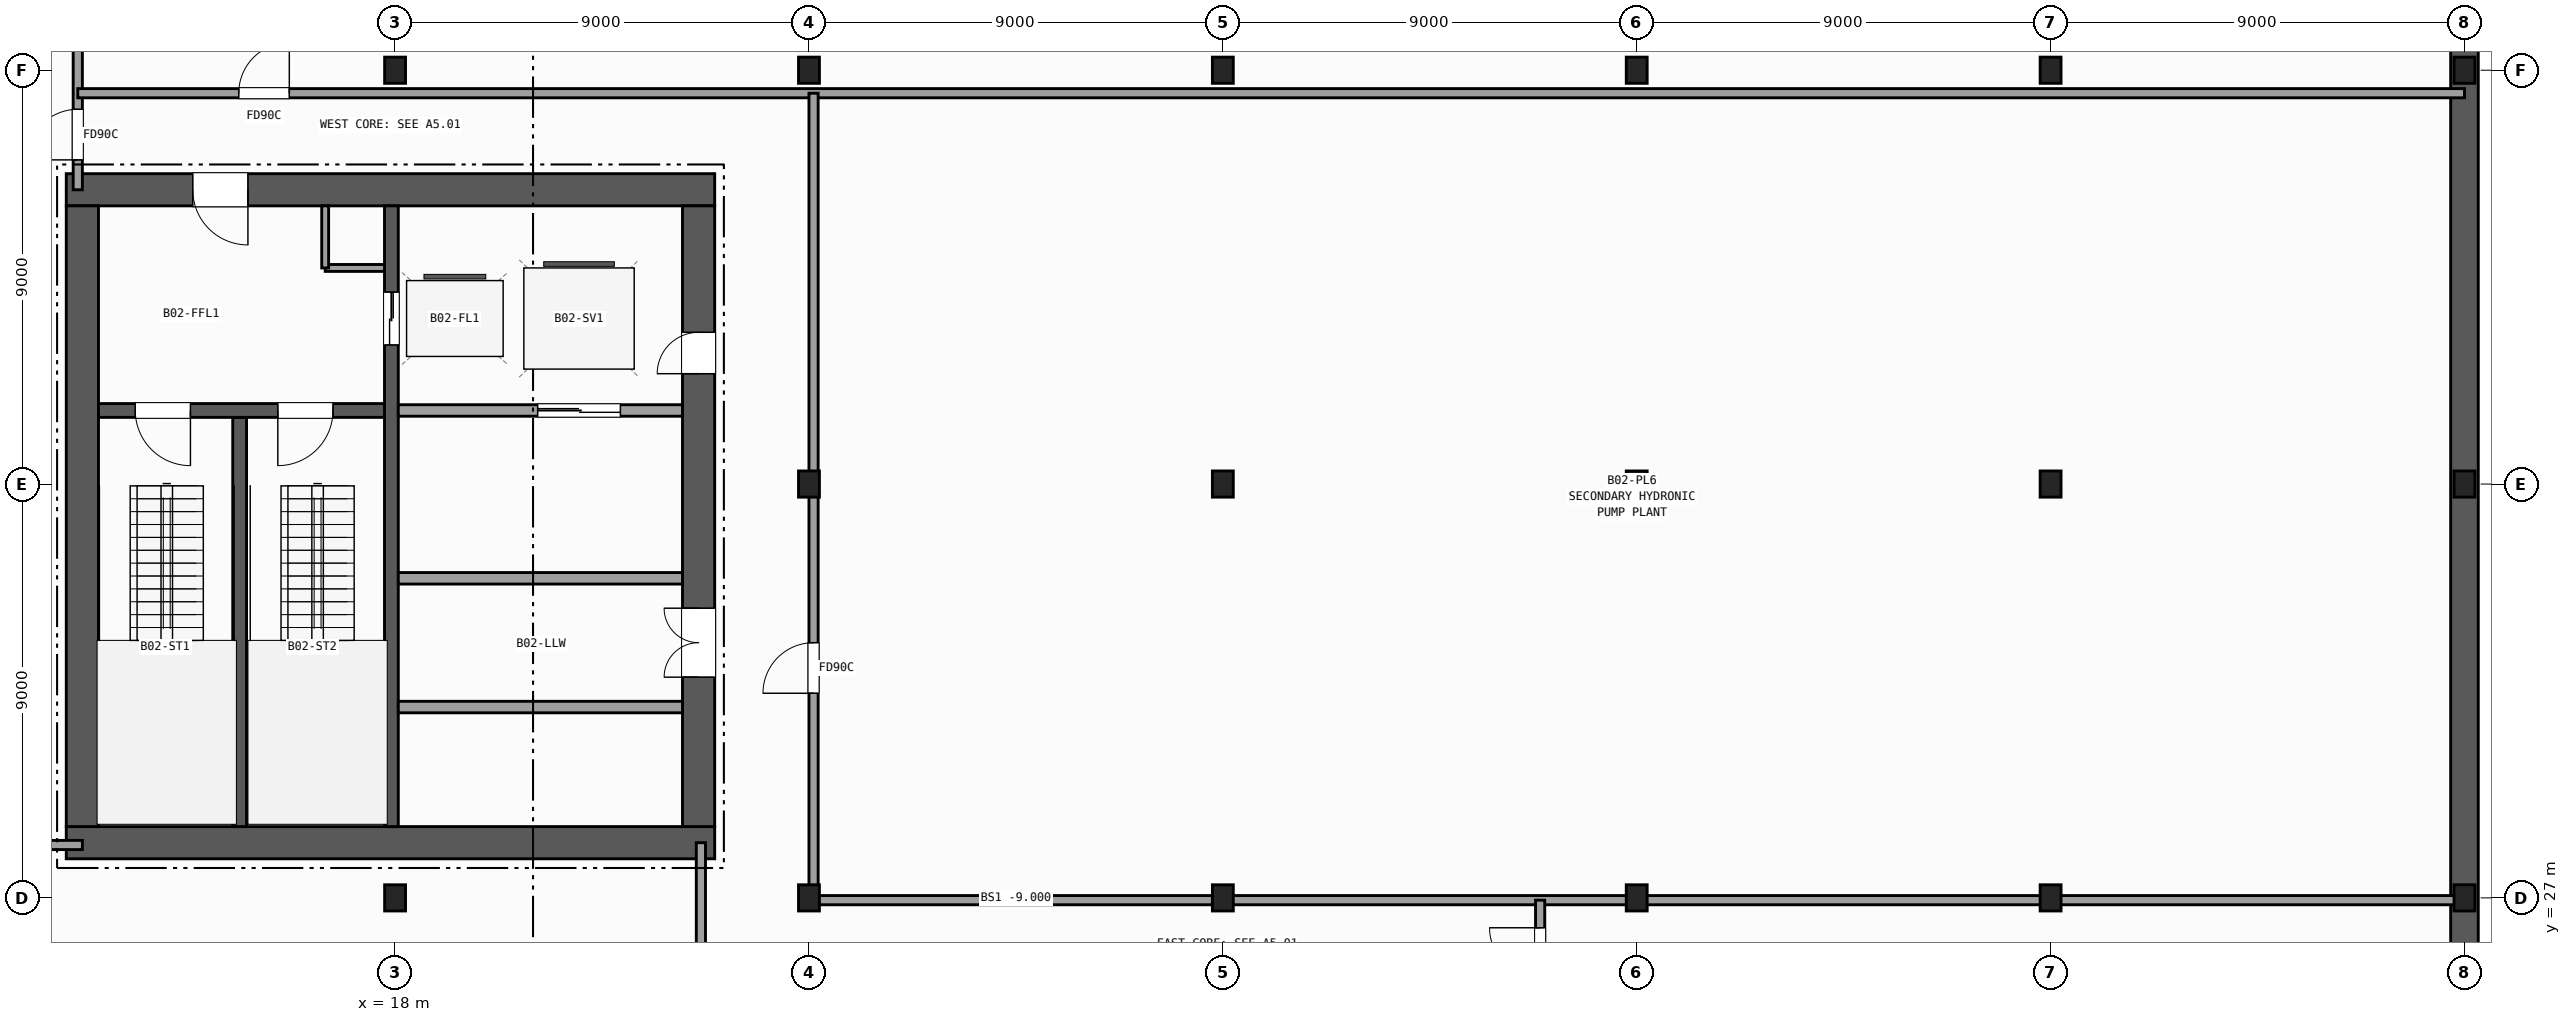
"""IFC4 building model, lengths in metres.
Left out: names, types, materials, properties, quantities, classifications, styles, units other than length and angle.
Written with IfcOpenShell. Run it as: python <this file> out.ifc"""

import sys

from ifc_helpers import new_model, si_unit, direction, frame, frame_2d, origin, origin_2d, place, context, subcontext, project, spatial, rectangle, i_section, extrude, element, fill, save


model = new_model("IFC4")
c1 = context("Model", 3, precision=1e-05, world=origin(), true_north=direction((0.0, 1.0)))
c2 = subcontext(c1, "Body", "Model", "MODEL_VIEW")
j1 = project(units=[si_unit("LENGTHUNIT", "METRE"), si_unit("PLANEANGLEUNIT", "RADIAN")], contexts=[c1])
p1 = place(None, origin())
s1 = spatial("IfcSite", under=j1, at=p1, CompositionType="ELEMENT")
p2 = place(p1, origin())
s2 = spatial("IfcBuilding", under=s1, at=p2, CompositionType="ELEMENT")
p3 = place(p2, frame((0.0, 0.0, -9.0)))
s3 = spatial("IfcBuildingStorey", under=s2, at=p3, CompositionType="ELEMENT", Elevation=-9.0)
for number, where, z_axis, x_axis in (
    (1, (18.0, 27.0, 0.0), (0.0, 0.0, 1.0), (1.0, 0.0, 0.0)),
    (2, (18.0, 45.0, 0.0), (0.0, 0.0, 1.0), (1.0, 0.0, 0.0)),
    (3, (27.0, 27.0, 0.0), (0.0, 0.0, 1.0), (1.0, 0.0, 0.0)),
    (4, (27.0, 36.0, 0.0), (0.0, 0.0, 1.0), (1.0, 0.0, 0.0)),
    (5, (27.0, 45.0, 0.0), (0.0, 0.0, 1.0), (1.0, 0.0, 0.0)),
    (6, (36.0, 27.0, 0.0), (0.0, 0.0, 1.0), (1.0, 0.0, 0.0)),
    (7, (36.0, 36.0, 0.0), (0.0, 0.0, 1.0), (1.0, 0.0, 0.0)),
    (8, (36.0, 45.0, 0.0), (0.0, 0.0, 1.0), (1.0, 0.0, 0.0)),
    (9, (45.0, 27.0, 0.0), (0.0, 0.0, 1.0), (1.0, 0.0, 0.0)),
    (10, (45.0, 36.0, 0.0), (0.0, 0.0, 1.0), (1.0, 0.0, 0.0)),
    (11, (45.0, 45.0, 0.0), (0.0, 0.0, 1.0), (1.0, 0.0, 0.0)),
    (12, (54.0, 27.0, 0.0), (0.0, 0.0, 1.0), (1.0, 0.0, 0.0)),
    (13, (54.0, 36.0, 0.0), (0.0, 0.0, 1.0), (1.0, 0.0, 0.0)),
    (14, (54.0, 45.0, 0.0), (0.0, 0.0, 1.0), (1.0, 0.0, 0.0)),
    (15, (63.0, 27.0, 0.0), (0.0, 0.0, 1.0), (1.0, 0.0, 0.0)),
    (16, (63.0, 36.0, 0.0), (0.0, 0.0, 1.0), (1.0, 0.0, 0.0)),
    (17, (63.0, 45.0, 0.0), (0.0, 0.0, 1.0), (1.0, 0.0, 0.0)),
):
    element("IfcColumn", number, at=place(p3, frame(where, z_axis=z_axis, x_axis=x_axis)), inside=s3, PredefinedType="COLUMN", context=c2, shape_type="SweptSolid", body=[
        extrude(i_section(OverallWidth=0.454, OverallDepth=0.569, WebThickness=0.078, FlangeThickness=0.125, FilletRadius=0.015, at=origin_2d()), origin(), (0.0, 0.0, 1.0), 4.5),
    ])
p4 = place(p3, frame((63.0, 54.3, 0.0), z_axis=(0.0, 0.0, 1.0), x_axis=(0.0, -1.0, 0.0)))
e18 = element("IfcWall", 18, at=p4, inside=s3, PredefinedType="SOLIDWALL", context=c2, shape_type="SweptSolid", body=[
    extrude(rectangle(XDim=54.6, YDim=0.6, at=frame_2d((27.3, 0.0))), origin(), (0.0, 0.0, 1.0), 4.15),
])
p5 = place(p3, frame((10.85, 28.2, 0.0), z_axis=(0.0, 0.0, 1.0), x_axis=(1.0, 0.0, 0.0)))
e19 = element("IfcWall", 19, at=p5, inside=s3, PredefinedType="SHEAR", context=c2, shape_type="SweptSolid", body=[
    extrude(rectangle(XDim=14.1, YDim=0.7, at=frame_2d((7.05, 0.0))), origin(), (0.0, 0.0, 1.0), 4.15),
])
p6 = place(p3, frame((24.95, 42.4, 0.0), z_axis=(0.0, 0.0, 1.0), x_axis=(-1.0, 0.0, 0.0)))
e20 = element("IfcWall", 20, at=p6, inside=s3, PredefinedType="SHEAR", context=c2, shape_type="SweptSolid", body=[
    extrude(rectangle(XDim=14.1, YDim=0.7, at=frame_2d((7.05, 0.0))), origin(), (0.0, 0.0, 1.0), 4.15),
])
p7 = place(p6, frame((10.15, 0.0, 0.0)))
e21 = element("IfcOpeningElement", 21, at=p7, cuts=e20, PredefinedType="OPENING", context=c2, shape_type="SweptSolid", body=[
    extrude(rectangle(XDim=1.2, YDim=2.15, at=frame_2d((0.6, 1.075))), frame((0.0, 0.36, 0.0), z_axis=(0.0, -1.0, 0.0), x_axis=(1.0, 0.0, 0.0)), (0.0, 0.0, 1.0), 0.72),
])
p8 = place(p3, frame((11.2, 42.05, 0.0), z_axis=(0.0, 0.0, 1.0), x_axis=(0.0, -1.0, 0.0)))
e22 = element("IfcWall", 22, at=p8, inside=s3, PredefinedType="SHEAR", context=c2, shape_type="SweptSolid", body=[
    extrude(rectangle(XDim=13.5, YDim=0.7, at=frame_2d((6.75, 0.0))), origin(), (0.0, 0.0, 1.0), 4.15),
])
p9 = place(p3, frame((24.6, 28.55, 0.0), z_axis=(0.0, 0.0, 1.0), x_axis=(0.0, 1.0, 0.0)))
e23 = element("IfcWall", 23, at=p9, inside=s3, PredefinedType="SHEAR", context=c2, shape_type="SweptSolid", body=[
    extrude(rectangle(XDim=13.5, YDim=0.7, at=frame_2d((6.75, 0.0))), origin(), (0.0, 0.0, 1.0), 4.15),
])
p10 = place(p9, frame((3.25, 0.0, 0.0)))
e24 = element("IfcOpeningElement", 24, at=p10, cuts=e23, PredefinedType="OPENING", context=c2, shape_type="SweptSolid", body=[
    extrude(rectangle(XDim=1.5, YDim=2.2, at=frame_2d((0.75, 1.1))), frame((0.0, 0.36, 0.0), z_axis=(0.0, -1.0, 0.0), x_axis=(1.0, 0.0, 0.0)), (0.0, 0.0, 1.0), 0.72),
])
p11 = place(p9, frame((9.85, 0.0, 0.0)))
e25 = element("IfcOpeningElement", 25, at=p11, cuts=e23, PredefinedType="OPENING", context=c2, shape_type="SweptSolid", body=[
    extrude(rectangle(XDim=0.9, YDim=2.1, at=frame_2d((0.45, 1.05))), frame((0.0, 0.36, 0.0), z_axis=(0.0, -1.0, 0.0), x_axis=(1.0, 0.0, 0.0)), (0.0, 0.0, 1.0), 0.72),
])
p12 = place(p3, frame((14.62, 28.55, 0.0), z_axis=(0.0, 0.0, 1.0), x_axis=(0.0, 1.0, 0.0)))
e26 = element("IfcWall", 26, at=p12, inside=s3, PredefinedType="SHEAR", context=c2, shape_type="SweptSolid", body=[
    extrude(rectangle(XDim=8.9, YDim=0.3, at=frame_2d((4.45, 0.0))), origin(), (0.0, 0.0, 1.0), 4.15),
])
p13 = place(p3, frame((17.92, 42.05, 0.0), z_axis=(0.0, 0.0, 1.0), x_axis=(0.0, -1.0, 0.0)))
e27 = element("IfcWall", 27, at=p13, inside=s3, PredefinedType="SHEAR", context=c2, shape_type="SweptSolid", body=[
    extrude(rectangle(XDim=13.5, YDim=0.3, at=frame_2d((6.75, 0.0))), origin(), (0.0, 0.0, 1.0), 4.15),
])
p14 = place(p13, frame((1.875, 0.0, 0.0)))
e28 = element("IfcOpeningElement", 28, at=p14, cuts=e27, PredefinedType="OPENING", context=c2, shape_type="SweptSolid", body=[
    extrude(rectangle(XDim=1.15, YDim=2.15, at=frame_2d((0.575, 1.075))), frame((0.0, 0.16, 0.0), z_axis=(0.0, -1.0, 0.0), x_axis=(1.0, 0.0, 0.0)), (0.0, 0.0, 1.0), 0.32),
])
p15 = place(p3, frame((17.77, 37.6, 0.0), z_axis=(0.0, 0.0, 1.0), x_axis=(-1.0, 0.0, 0.0)))
e29 = element("IfcWall", 29, at=p15, inside=s3, PredefinedType="SHEAR", context=c2, shape_type="SweptSolid", body=[
    extrude(rectangle(XDim=6.22, YDim=0.3, at=frame_2d((3.11, 0.0))), origin(), (0.0, 0.0, 1.0), 4.15),
])
p16 = place(p15, frame((4.22, 0.0, 0.0)))
e30 = element("IfcOpeningElement", 30, at=p16, cuts=e29, PredefinedType="OPENING", context=c2, shape_type="SweptSolid", body=[
    extrude(rectangle(XDim=1.2, YDim=2.15, at=frame_2d((0.6, 1.075))), frame((0.0, 0.16, 0.0), z_axis=(0.0, -1.0, 0.0), x_axis=(1.0, 0.0, 0.0)), (0.0, 0.0, 1.0), 0.32),
])
p17 = place(p15, frame((1.12, 0.0, 0.0)))
e31 = element("IfcOpeningElement", 31, at=p17, cuts=e29, PredefinedType="OPENING", context=c2, shape_type="SweptSolid", body=[
    extrude(rectangle(XDim=1.2, YDim=2.15, at=frame_2d((0.6, 1.075))), frame((0.0, 0.16, 0.0), z_axis=(0.0, -1.0, 0.0), x_axis=(1.0, 0.0, 0.0)), (0.0, 0.0, 1.0), 0.32),
])
p18 = place(p3, frame((16.48, 40.7, 0.0), z_axis=(0.0, 0.0, 1.0), x_axis=(1.0, 0.0, 0.0)))
e32 = element("IfcWall", 32, at=p18, inside=s3, PredefinedType="PARTITIONING", context=c2, shape_type="SweptSolid", body=[
    extrude(rectangle(XDim=1.29, YDim=0.15, at=frame_2d((0.645, 0.0))), origin(), (0.0, 0.0, 1.0), 4.15),
])
p19 = place(p3, frame((16.48, 40.7, 0.0), z_axis=(0.0, 0.0, 1.0), x_axis=(0.0, 1.0, 0.0)))
e33 = element("IfcWall", 33, at=p19, inside=s3, PredefinedType="PARTITIONING", context=c2, shape_type="SweptSolid", body=[
    extrude(rectangle(XDim=1.35, YDim=0.15, at=frame_2d((0.675, 0.0))), origin(), (0.0, 0.0, 1.0), 4.15),
])
p20 = place(p3, frame((18.07, 37.6, 0.0), z_axis=(0.0, 0.0, 1.0), x_axis=(1.0, 0.0, 0.0)))
e34 = element("IfcWall", 34, at=p20, inside=s3, PredefinedType="PARTITIONING", context=c2, shape_type="SweptSolid", body=[
    extrude(rectangle(XDim=6.18, YDim=0.25, at=frame_2d((3.09, 0.0))), origin(), (0.0, 0.0, 1.0), 4.15),
])
p21 = place(p20, frame((3.03, 0.0, 0.0)))
e35 = element("IfcOpeningElement", 35, at=p21, cuts=e34, PredefinedType="OPENING", context=c2, shape_type="SweptSolid", body=[
    extrude(rectangle(XDim=1.8, YDim=2.3, at=frame_2d((0.9, 1.15))), frame((0.0, 0.135, 0.0), z_axis=(0.0, -1.0, 0.0), x_axis=(1.0, 0.0, 0.0)), (0.0, 0.0, 1.0), 0.27),
])
for number, where, z_axis, x_axis in (
    (36, (18.07, 31.15, 0.0), (0.0, 0.0, 1.0), (1.0, 0.0, 0.0)),
    (37, (24.25, 33.95, 0.0), (0.0, 0.0, 1.0), (-1.0, 0.0, 0.0)),
):
    element("IfcWall", number, at=place(p3, frame(where, z_axis=z_axis, x_axis=x_axis)), inside=s3, PredefinedType="PARTITIONING", context=c2, shape_type="SweptSolid", body=[
        extrude(rectangle(XDim=6.18, YDim=0.25, at=frame_2d((3.09, 0.0))), origin(), (0.0, 0.0, 1.0), 4.15),
    ])
p22 = place(p3, frame((24.65, 0.0, 0.0), z_axis=(0.0, 0.0, 1.0), x_axis=(0.0, 1.0, 0.0)))
e38 = element("IfcWall", 38, at=p22, inside=s3, PredefinedType="PARTITIONING", context=c2, shape_type="SweptSolid", body=[
    extrude(rectangle(XDim=28.2, YDim=0.2, at=frame_2d((14.1, 0.0))), origin(), (0.0, 0.0, 1.0), 3.203),
])
p23 = place(p22, frame((13.0, 0.0, 0.0)))
e39 = element("IfcOpeningElement", 39, at=p23, cuts=e38, PredefinedType="OPENING", context=c2, shape_type="SweptSolid", body=[
    extrude(rectangle(XDim=1.1, YDim=2.15, at=frame_2d((0.55, 1.075))), frame((0.0, 0.11, 0.0), z_axis=(0.0, -1.0, 0.0), x_axis=(1.0, 0.0, 0.0)), (0.0, 0.0, 1.0), 0.22),
])
p24 = place(p3, frame((0.0, 28.15, 0.0), z_axis=(0.0, 0.0, 1.0), x_axis=(1.0, 0.0, 0.0)))
e40 = element("IfcWall", 40, at=p24, inside=s3, PredefinedType="PARTITIONING", context=c2, shape_type="SweptSolid", body=[
    extrude(rectangle(XDim=11.2, YDim=0.2, at=frame_2d((5.6, 0.0))), origin(), (0.0, 0.0, 1.0), 3.275),
])
p25 = place(p3, frame((11.1, 42.4, 0.0), z_axis=(0.0, 0.0, 1.0), x_axis=(0.0, 1.0, 0.0)))
e41 = element("IfcWall", 41, at=p25, inside=s3, PredefinedType="PARTITIONING", context=c2, shape_type="SweptSolid", body=[
    extrude(rectangle(XDim=11.6, YDim=0.2, at=frame_2d((5.8, 0.0))), origin(), (0.0, 0.0, 1.0), 3.203),
])
p26 = place(p25, frame((0.65, 0.0, 0.0)))
e42 = element("IfcOpeningElement", 42, at=p26, cuts=e41, PredefinedType="OPENING", context=c2, shape_type="SweptSolid", body=[
    extrude(rectangle(XDim=1.1, YDim=2.15, at=frame_2d((0.55, 1.075))), frame((0.0, 0.11, 0.0), z_axis=(0.0, -1.0, 0.0), x_axis=(1.0, 0.0, 0.0)), (0.0, 0.0, 1.0), 0.22),
])
p27 = place(p3, frame((11.1, 44.5, 0.0), z_axis=(0.0, 0.0, 1.0), x_axis=(1.0, 0.0, 0.0)))
e43 = element("IfcWall", 43, at=p27, inside=s3, PredefinedType="PARTITIONING", context=c2, shape_type="SweptSolid", body=[
    extrude(rectangle(XDim=51.9, YDim=0.2, at=frame_2d((25.95, 0.0))), origin(), (0.0, 0.0, 1.0), 3.275),
])
p28 = place(p27, frame((3.5, 0.0, 0.0)))
e44 = element("IfcOpeningElement", 44, at=p28, cuts=e43, PredefinedType="OPENING", context=c2, shape_type="SweptSolid", body=[
    extrude(rectangle(XDim=1.1, YDim=2.15, at=frame_2d((0.55, 1.075))), frame((0.0, 0.11, 0.0), z_axis=(0.0, -1.0, 0.0), x_axis=(1.0, 0.0, 0.0)), (0.0, 0.0, 1.0), 0.22),
])
p29 = place(p3, frame((27.1, 26.95, 0.0), z_axis=(0.0, 0.0, 1.0), x_axis=(0.0, 1.0, 0.0)))
e45 = element("IfcWall", 45, at=p29, inside=s3, PredefinedType="PARTITIONING", context=c2, shape_type="SweptSolid", body=[
    extrude(rectangle(XDim=17.55, YDim=0.2, at=frame_2d((8.775, 0.0))), origin(), (0.0, 0.0, 1.0), 3.203),
])
p30 = place(p29, frame((4.5, 0.0, 0.0)))
e46 = element("IfcOpeningElement", 46, at=p30, cuts=e45, PredefinedType="OPENING", context=c2, shape_type="SweptSolid", body=[
    extrude(rectangle(XDim=1.1, YDim=2.15, at=frame_2d((0.55, 1.075))), frame((0.0, 0.11, 0.0), z_axis=(0.0, -1.0, 0.0), x_axis=(1.0, 0.0, 0.0)), (0.0, 0.0, 1.0), 0.22),
])
p31 = place(p3, frame((27.1, 26.95, 0.0), z_axis=(0.0, 0.0, 1.0), x_axis=(1.0, 0.0, 0.0)))
e47 = element("IfcWall", 47, at=p31, inside=s3, PredefinedType="PARTITIONING", context=c2, shape_type="SweptSolid", body=[
    extrude(rectangle(XDim=35.9, YDim=0.2, at=frame_2d((17.95, 0.0))), origin(), (0.0, 0.0, 1.0), 3.203),
])
p32 = place(p3, frame((42.9, 24.6, 0.0), z_axis=(0.0, 0.0, 1.0), x_axis=(0.0, 1.0, 0.0)))
e48 = element("IfcWall", 48, at=p32, inside=s3, PredefinedType="PARTITIONING", context=c2, shape_type="SweptSolid", body=[
    extrude(rectangle(XDim=2.35, YDim=0.2, at=frame_2d((1.175, 0.0))), origin(), (0.0, 0.0, 1.0), 3.203),
])
p33 = place(p32, frame((0.65, 0.0, 0.0)))
e49 = element("IfcOpeningElement", 49, at=p33, cuts=e48, PredefinedType="OPENING", context=c2, shape_type="SweptSolid", body=[
    extrude(rectangle(XDim=1.1, YDim=2.15, at=frame_2d((0.55, 1.075))), frame((0.0, 0.11, 0.0), z_axis=(0.0, -1.0, 0.0), x_axis=(1.0, 0.0, 0.0)), (0.0, 0.0, 1.0), 0.22),
])
p34 = place(p16, origin())
e50 = element("IfcDoor", 50, at=p34, inside=s3, OperationType="SINGLE_SWING_LEFT", PredefinedType="DOOR", context=c2, shape_type="SweptSolid", body=[
    extrude(rectangle(XDim=1.2, YDim=2.15, at=frame_2d((0.6, 1.075))), frame((0.0, 0.025, 0.0), z_axis=(0.0, -1.0, 0.0), x_axis=(1.0, 0.0, 0.0)), (0.0, 0.0, 1.0), 0.05),
])
fill(e30, e50)
p35 = place(p17, origin())
e51 = element("IfcDoor", 51, at=p35, inside=s3, OperationType="SINGLE_SWING_RIGHT", PredefinedType="DOOR", context=c2, shape_type="SweptSolid", body=[
    extrude(rectangle(XDim=1.2, YDim=2.15, at=frame_2d((0.6, 1.075))), frame((0.0, 0.025, 0.0), z_axis=(0.0, -1.0, 0.0), x_axis=(1.0, 0.0, 0.0)), (0.0, 0.0, 1.0), 0.05),
])
fill(e31, e51)
p36 = place(p10, origin())
e52 = element("IfcDoor", 52, at=p36, inside=s3, OperationType="DOUBLE_DOOR_SINGLE_SWING", PredefinedType="DOOR", context=c2, shape_type="SweptSolid", body=[
    extrude(rectangle(XDim=1.5, YDim=2.2, at=frame_2d((0.75, 1.1))), frame((0.0, 0.025, 0.0), z_axis=(0.0, -1.0, 0.0), x_axis=(1.0, 0.0, 0.0)), (0.0, 0.0, 1.0), 0.05),
])
fill(e24, e52)
p37 = place(p7, origin())
e53 = element("IfcDoor", 53, at=p37, inside=s3, OperationType="SINGLE_SWING_LEFT", PredefinedType="DOOR", context=c2, shape_type="SweptSolid", body=[
    extrude(rectangle(XDim=1.2, YDim=2.15, at=frame_2d((0.6, 1.075))), frame((0.0, 0.025, 0.0), z_axis=(0.0, -1.0, 0.0), x_axis=(1.0, 0.0, 0.0)), (0.0, 0.0, 1.0), 0.05),
])
fill(e21, e53)
p38 = place(p11, origin())
e54 = element("IfcDoor", 54, at=p38, inside=s3, OperationType="SINGLE_SWING_LEFT", PredefinedType="DOOR", context=c2, shape_type="SweptSolid", body=[
    extrude(rectangle(XDim=0.9, YDim=2.1, at=frame_2d((0.45, 1.05))), frame((0.0, 0.025, 0.0), z_axis=(0.0, -1.0, 0.0), x_axis=(1.0, 0.0, 0.0)), (0.0, 0.0, 1.0), 0.05),
])
fill(e25, e54)
p39 = place(p14, origin())
e55 = element("IfcDoor", 55, at=p39, inside=s3, OperationType="DOUBLE_DOOR_SLIDING", PredefinedType="DOOR", context=c2, shape_type="SweptSolid", body=[
    extrude(rectangle(XDim=1.15, YDim=2.15, at=frame_2d((0.575, 1.075))), frame((0.0, 0.025, 0.0), z_axis=(0.0, -1.0, 0.0), x_axis=(1.0, 0.0, 0.0)), (0.0, 0.0, 1.0), 0.05),
])
fill(e28, e55)
p40 = place(p21, origin())
e56 = element("IfcDoor", 56, at=p40, inside=s3, OperationType="DOUBLE_DOOR_SLIDING", PredefinedType="DOOR", context=c2, shape_type="SweptSolid", body=[
    extrude(rectangle(XDim=1.8, YDim=2.3, at=frame_2d((0.9, 1.15))), frame((0.0, 0.025, 0.0), z_axis=(0.0, -1.0, 0.0), x_axis=(1.0, 0.0, 0.0)), (0.0, 0.0, 1.0), 0.05),
])
fill(e35, e56)
p41 = place(p33, origin())
e57 = element("IfcDoor", 57, at=p41, inside=s3, OperationType="SINGLE_SWING_RIGHT", PredefinedType="DOOR", context=c2, shape_type="SweptSolid", body=[
    extrude(rectangle(XDim=1.1, YDim=2.15, at=frame_2d((0.55, 1.075))), frame((0.0, 0.025, 0.0), z_axis=(0.0, -1.0, 0.0), x_axis=(1.0, 0.0, 0.0)), (0.0, 0.0, 1.0), 0.05),
])
fill(e49, e57)
p42 = place(p26, origin())
e58 = element("IfcDoor", 58, at=p42, inside=s3, OperationType="SINGLE_SWING_LEFT", PredefinedType="DOOR", context=c2, shape_type="SweptSolid", body=[
    extrude(rectangle(XDim=1.1, YDim=2.15, at=frame_2d((0.55, 1.075))), frame((0.0, 0.025, 0.0), z_axis=(0.0, -1.0, 0.0), x_axis=(1.0, 0.0, 0.0)), (0.0, 0.0, 1.0), 0.05),
])
fill(e42, e58)
p43 = place(p28, origin())
e59 = element("IfcDoor", 59, at=p43, inside=s3, OperationType="SINGLE_SWING_RIGHT", PredefinedType="DOOR", context=c2, shape_type="SweptSolid", body=[
    extrude(rectangle(XDim=1.1, YDim=2.15, at=frame_2d((0.55, 1.075))), frame((0.0, 0.025, 0.0), z_axis=(0.0, -1.0, 0.0), x_axis=(1.0, 0.0, 0.0)), (0.0, 0.0, 1.0), 0.05),
])
fill(e44, e59)
p44 = place(p30, origin())
e60 = element("IfcDoor", 60, at=p44, inside=s3, OperationType="SINGLE_SWING_LEFT", PredefinedType="DOOR", context=c2, shape_type="SweptSolid", body=[
    extrude(rectangle(XDim=1.1, YDim=2.15, at=frame_2d((0.55, 1.075))), frame((0.0, 0.025, 0.0), z_axis=(0.0, -1.0, 0.0), x_axis=(1.0, 0.0, 0.0)), (0.0, 0.0, 1.0), 0.05),
])
fill(e46, e60)
save(model, sys.argv[1])
